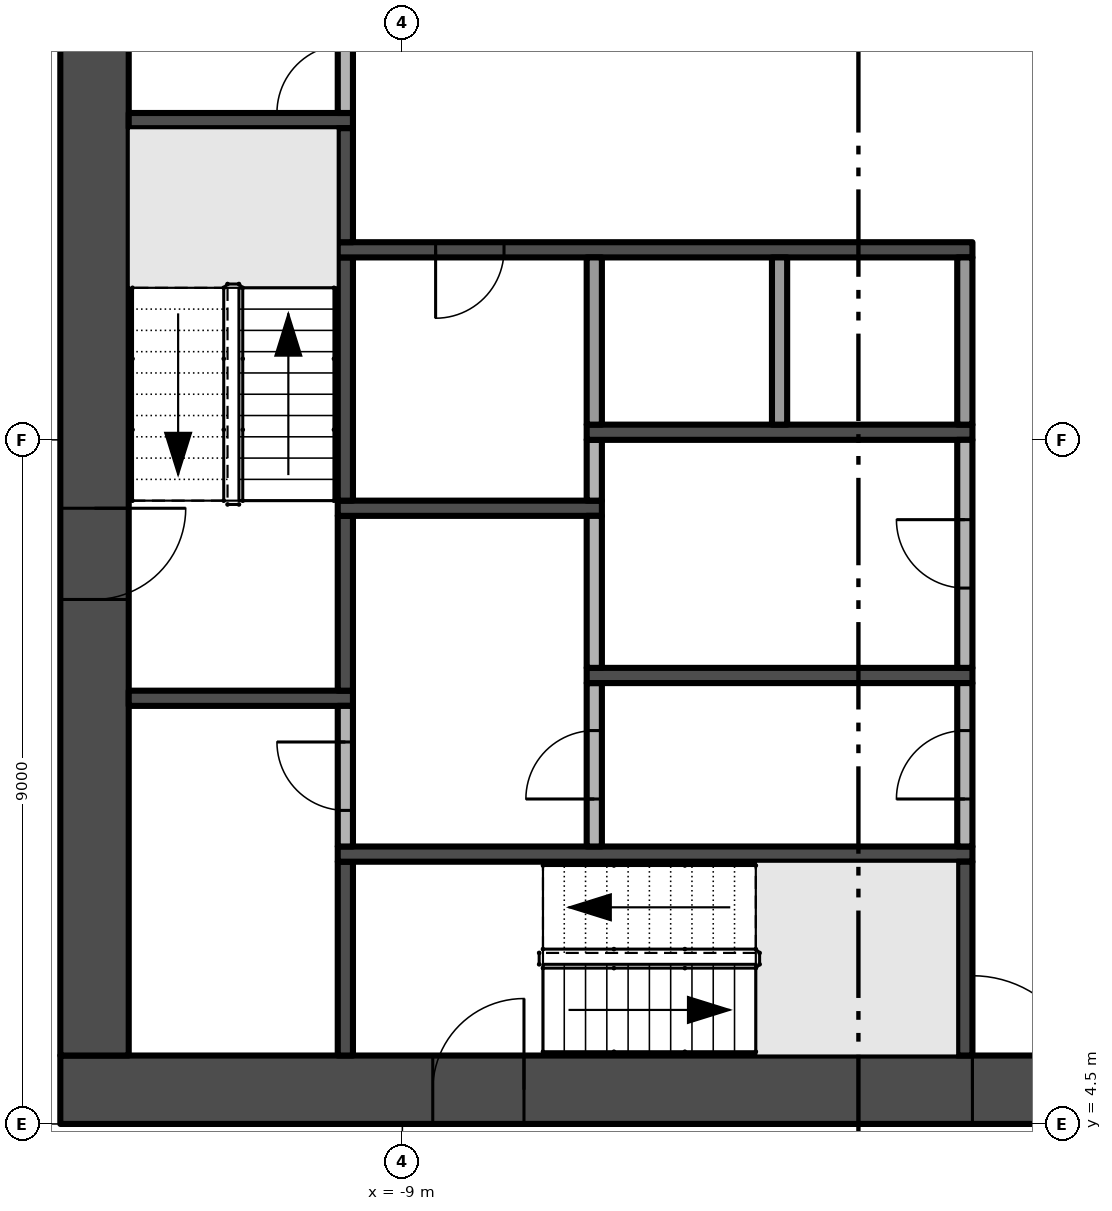
"""IFC4 building model, lengths in metres.
Left out: names, types, materials, properties, quantities, classifications, styles, units other than length and angle.
Written with IfcOpenShell. Run it as: python <this file> out.ifc"""

import sys

from ifc_helpers import new_model, si_unit, direction, frame, frame_2d, origin, place, context, subcontext, project, spatial, rectangle, extrude, element, fill, save


model = new_model("IFC4")
c1 = context("Model", 3, precision=1e-05, world=origin(), true_north=direction((0.0, 1.0)))
c2 = subcontext(c1, "Body", "Model", "MODEL_VIEW")
j1 = project(units=[si_unit("LENGTHUNIT", "METRE"), si_unit("PLANEANGLEUNIT", "RADIAN")], contexts=[c1])
p1 = place(None, origin())
s1 = spatial("IfcSite", under=j1, at=p1, CompositionType="ELEMENT")
p2 = place(p1, origin())
s2 = spatial("IfcBuilding", under=s1, at=p2, CompositionType="ELEMENT")
p3 = place(p2, frame((0.0, 0.0, 15.0)))
s3 = spatial("IfcBuildingStorey", under=s2, at=p3, CompositionType="ELEMENT", Elevation=15.0)
p4 = place(p3, frame((-13.5, 4.95, -0.3), z_axis=(0.0, 0.0, 1.0), x_axis=(1.0, 0.0, 0.0)))
e1 = element("IfcWall", 1, at=p4, inside=s3, PredefinedType="SHEAR", context=c2, shape_type="SweptSolid", body=[
    extrude(rectangle(XDim=27.0, YDim=0.9, at=frame_2d((13.5, 0.0))), origin(), (0.0, 0.0, 1.0), 3.8),
])
p5 = place(p4, frame((12.0, 0.0, 0.3)))
e2 = element("IfcOpeningElement", 2, at=p5, cuts=e1, PredefinedType="OPENING", context=c2, shape_type="SweptSolid", body=[
    extrude(rectangle(XDim=3.0, YDim=2.4, at=frame_2d((1.5, 1.2))), frame((0.0, 0.46, 0.0), z_axis=(0.0, -1.0, 0.0), x_axis=(1.0, 0.0, 0.0)), (0.0, 0.0, 1.0), 0.92),
])
p6 = place(p4, frame((4.9, 0.0, 0.3)))
e3 = element("IfcOpeningElement", 3, at=p6, cuts=e1, PredefinedType="OPENING", context=c2, shape_type="SweptSolid", body=[
    extrude(rectangle(XDim=1.2, YDim=2.2, at=frame_2d((0.6, 1.1))), frame((0.0, 0.46, 0.0), z_axis=(0.0, -1.0, 0.0), x_axis=(1.0, 0.0, 0.0)), (0.0, 0.0, 1.0), 0.92),
])
p7 = place(p4, frame((20.75, 0.0, 0.3)))
e4 = element("IfcOpeningElement", 4, at=p7, cuts=e1, PredefinedType="OPENING", context=c2, shape_type="SweptSolid", body=[
    extrude(rectangle(XDim=1.5, YDim=2.2, at=frame_2d((0.75, 1.1))), frame((0.0, 0.46, 0.0), z_axis=(0.0, -1.0, 0.0), x_axis=(1.0, 0.0, 0.0)), (0.0, 0.0, 1.0), 0.92),
])
p8 = place(p4, frame((17.4, 0.0, 0.3)))
e5 = element("IfcOpeningElement", 5, at=p8, cuts=e1, PredefinedType="OPENING", context=c2, shape_type="SweptSolid", body=[
    extrude(rectangle(XDim=1.2, YDim=2.2, at=frame_2d((0.6, 1.1))), frame((0.0, 0.46, 0.0), z_axis=(0.0, -1.0, 0.0), x_axis=(1.0, 0.0, 0.0)), (0.0, 0.0, 1.0), 0.92),
])
p9 = place(p3, frame((-13.05, 21.6, -0.3), z_axis=(0.0, 0.0, 1.0), x_axis=(0.0, -1.0, 0.0)))
e6 = element("IfcWall", 6, at=p9, inside=s3, PredefinedType="SHEAR", context=c2, shape_type="SweptSolid", body=[
    extrude(rectangle(XDim=16.2, YDim=0.9, at=frame_2d((8.1, 0.0))), origin(), (0.0, 0.0, 1.0), 3.8),
])
p10 = place(p9, frame((9.0, 0.0, 0.3)))
e7 = element("IfcOpeningElement", 7, at=p10, cuts=e6, PredefinedType="OPENING", context=c2, shape_type="SweptSolid", body=[
    extrude(rectangle(XDim=1.2, YDim=2.2, at=frame_2d((0.6, 1.1))), frame((0.0, 0.46, 0.0), z_axis=(0.0, -1.0, 0.0), x_axis=(1.0, 0.0, 0.0)), (0.0, 0.0, 1.0), 0.92),
])
for number, where, z_axis, x_axis in (
    (8, (-12.6, 10.1, 0.0), (0.0, 0.0, 1.0), (1.0, 0.0, 0.0)),
    (9, (-12.6, 17.7, 0.0), (0.0, 0.0, 1.0), (1.0, 0.0, 0.0)),
):
    element("IfcWall", number, at=place(p3, frame(where, z_axis=z_axis, x_axis=x_axis)), inside=s3, PredefinedType="SHEAR", context=c2, shape_type="SweptSolid", body=[
        extrude(rectangle(XDim=2.95, YDim=0.2, at=frame_2d((1.475, 0.0))), origin(), (0.0, 0.0, 1.0), 3.5),
    ])
p11 = place(p3, frame((-9.75, 5.4, 0.0), z_axis=(0.0, 0.0, 1.0), x_axis=(0.0, 1.0, 0.0)))
e10 = element("IfcWall", 10, at=p11, inside=s3, PredefinedType="SHEAR", context=c2, shape_type="SweptSolid", body=[
    extrude(rectangle(XDim=2.55, YDim=0.2, at=frame_2d((1.275, 0.0))), origin(), (0.0, 0.0, 1.0), 3.5),
])
p12 = place(p3, frame((-9.85, 8.05, 0.0), z_axis=(0.0, 0.0, 1.0), x_axis=(1.0, 0.0, 0.0)))
e11 = element("IfcWall", 11, at=p12, inside=s3, PredefinedType="SHEAR", context=c2, shape_type="SweptSolid", body=[
    extrude(rectangle(XDim=8.35, YDim=0.2, at=frame_2d((4.175, 0.0))), origin(), (0.0, 0.0, 1.0), 3.5),
])
p13 = place(p3, frame((-9.75, 8.15, 0.0), z_axis=(0.0, 0.0, 1.0), x_axis=(0.0, 1.0, 0.0)))
e12 = element("IfcWall", 12, at=p13, inside=s3, PredefinedType="PARTITIONING", context=c2, shape_type="SweptSolid", body=[
    extrude(rectangle(XDim=1.85, YDim=0.2, at=frame_2d((0.925, 0.0))), origin(), (0.0, 0.0, 1.0), 3.5),
])
p14 = place(p13, frame((0.475, 0.0, 0.0)))
e13 = element("IfcOpeningElement", 13, at=p14, cuts=e12, PredefinedType="OPENING", context=c2, shape_type="SweptSolid", body=[
    extrude(rectangle(XDim=0.9, YDim=2.1, at=frame_2d((0.45, 1.05))), frame((0.0, 0.11, 0.0), z_axis=(0.0, -1.0, 0.0), x_axis=(1.0, 0.0, 0.0)), (0.0, 0.0, 1.0), 0.22),
])
p15 = place(p3, frame((-9.75, 10.2, 0.0), z_axis=(0.0, 0.0, 1.0), x_axis=(0.0, 1.0, 0.0)))
e14 = element("IfcWall", 14, at=p15, inside=s3, PredefinedType="SHEAR", context=c2, shape_type="SweptSolid", body=[
    extrude(rectangle(XDim=2.3, YDim=0.2, at=frame_2d((1.15, 0.0))), origin(), (0.0, 0.0, 1.0), 3.5),
])
p16 = place(p3, frame((-9.85, 12.6, 0.0), z_axis=(0.0, 0.0, 1.0), x_axis=(1.0, 0.0, 0.0)))
e15 = element("IfcWall", 15, at=p16, inside=s3, PredefinedType="SHEAR", context=c2, shape_type="SweptSolid", body=[
    extrude(rectangle(XDim=3.475, YDim=0.2, at=frame_2d((1.738, 0.0))), origin(), (0.0, 0.0, 1.0), 3.5),
])
p17 = place(p3, frame((-9.75, 12.7, 0.0), z_axis=(0.0, 0.0, 1.0), x_axis=(0.0, 1.0, 0.0)))
e16 = element("IfcWall", 16, at=p17, inside=s3, PredefinedType="SHEAR", context=c2, shape_type="SweptSolid", body=[
    extrude(rectangle(XDim=3.2, YDim=0.2, at=frame_2d((1.6, 0.0))), origin(), (0.0, 0.0, 1.0), 3.5),
])
p18 = place(p3, frame((-1.5, 16.0, 0.0), z_axis=(0.0, 0.0, 1.0), x_axis=(-1.0, 0.0, 0.0)))
e17 = element("IfcWall", 17, at=p18, inside=s3, PredefinedType="SHEAR", context=c2, shape_type="SweptSolid", body=[
    extrude(rectangle(XDim=8.35, YDim=0.2, at=frame_2d((4.175, 0.0))), origin(), (0.0, 0.0, 1.0), 3.5),
])
p19 = place(p18, frame((6.162, 0.0, 0.0)))
e18 = element("IfcOpeningElement", 18, at=p19, cuts=e17, PredefinedType="OPENING", context=c2, shape_type="SweptSolid", body=[
    extrude(rectangle(XDim=0.9, YDim=2.1, at=frame_2d((0.45, 1.05))), frame((0.0, 0.11, 0.0), z_axis=(0.0, -1.0, 0.0), x_axis=(1.0, 0.0, 0.0)), (0.0, 0.0, 1.0), 0.22),
])
p20 = place(p3, frame((-9.75, 16.1, 0.0), z_axis=(0.0, 0.0, 1.0), x_axis=(0.0, 1.0, 0.0)))
e19 = element("IfcWall", 19, at=p20, inside=s3, PredefinedType="SHEAR", context=c2, shape_type="SweptSolid", body=[
    extrude(rectangle(XDim=1.5, YDim=0.2, at=frame_2d((0.75, 0.0))), origin(), (0.0, 0.0, 1.0), 3.5),
])
p21 = place(p3, frame((-9.75, 17.8, 0.0), z_axis=(0.0, 0.0, 1.0), x_axis=(0.0, 1.0, 0.0)))
e20 = element("IfcWall", 20, at=p21, inside=s3, PredefinedType="PARTITIONING", context=c2, shape_type="SweptSolid", body=[
    extrude(rectangle(XDim=1.4, YDim=0.2, at=frame_2d((0.7, 0.0))), origin(), (0.0, 0.0, 1.0), 3.5),
])
p22 = place(p21, origin())
e21 = element("IfcOpeningElement", 21, at=p22, cuts=e20, PredefinedType="OPENING", context=c2, shape_type="SweptSolid", body=[
    extrude(rectangle(XDim=0.9, YDim=2.1, at=frame_2d((0.45, 1.05))), frame((0.0, 0.11, 0.0), z_axis=(0.0, -1.0, 0.0), x_axis=(1.0, 0.0, 0.0)), (0.0, 0.0, 1.0), 0.22),
])
p23 = place(p3, frame((-6.475, 8.15, 0.0), z_axis=(0.0, 0.0, 1.0), x_axis=(0.0, 1.0, 0.0)))
e22 = element("IfcWall", 22, at=p23, inside=s3, PredefinedType="PARTITIONING", context=c2, shape_type="SweptSolid", body=[
    extrude(rectangle(XDim=2.15, YDim=0.2, at=frame_2d((1.075, 0.0))), origin(), (0.0, 0.0, 1.0), 3.5),
])
p24 = place(p23, frame((0.625, 0.0, 0.0)))
e23 = element("IfcOpeningElement", 23, at=p24, cuts=e22, PredefinedType="OPENING", context=c2, shape_type="SweptSolid", body=[
    extrude(rectangle(XDim=0.9, YDim=2.1, at=frame_2d((0.45, 1.05))), frame((0.0, 0.11, 0.0), z_axis=(0.0, -1.0, 0.0), x_axis=(1.0, 0.0, 0.0)), (0.0, 0.0, 1.0), 0.22),
])
p25 = place(p3, frame((-6.575, 10.4, 0.0), z_axis=(0.0, 0.0, 1.0), x_axis=(1.0, 0.0, 0.0)))
e24 = element("IfcWall", 24, at=p25, inside=s3, PredefinedType="SHEAR", context=c2, shape_type="SweptSolid", body=[
    extrude(rectangle(XDim=5.075, YDim=0.2, at=frame_2d((2.538, 0.0))), origin(), (0.0, 0.0, 1.0), 3.5),
])
p26 = place(p3, frame((-6.475, 10.5, 0.0), z_axis=(0.0, 0.0, 1.0), x_axis=(0.0, 1.0, 0.0)))
e25 = element("IfcWall", 25, at=p26, inside=s3, PredefinedType="PARTITIONING", context=c2, shape_type="SweptSolid", body=[
    extrude(rectangle(XDim=2.0, YDim=0.2, at=frame_2d((1.0, 0.0))), origin(), (0.0, 0.0, 1.0), 3.5),
])
p27 = place(p3, frame((-6.475, 12.7, 0.0), z_axis=(0.0, 0.0, 1.0), x_axis=(0.0, 1.0, 0.0)))
e26 = element("IfcWall", 26, at=p27, inside=s3, PredefinedType="PARTITIONING", context=c2, shape_type="SweptSolid", body=[
    extrude(rectangle(XDim=0.8, YDim=0.2, at=frame_2d((0.4, 0.0))), origin(), (0.0, 0.0, 1.0), 3.5),
])
p28 = place(p3, frame((-6.575, 13.6, 0.0), z_axis=(0.0, 0.0, 1.0), x_axis=(1.0, 0.0, 0.0)))
e27 = element("IfcWall", 27, at=p28, inside=s3, PredefinedType="SHEAR", context=c2, shape_type="SweptSolid", body=[
    extrude(rectangle(XDim=5.075, YDim=0.2, at=frame_2d((2.538, 0.0))), origin(), (0.0, 0.0, 1.0), 3.5),
])
for number, where, z_axis, x_axis in (
    (28, (-6.475, 13.7, 0.0), (0.0, 0.0, 1.0), (0.0, 1.0, 0.0)),
    (29, (-4.037, 13.7, 0.0), (0.0, 0.0, 1.0), (0.0, 1.0, 0.0)),
):
    element("IfcWall", number, at=place(p3, frame(where, z_axis=z_axis, x_axis=x_axis)), inside=s3, PredefinedType="PARTITIONING", context=c2, shape_type="SweptSolid", body=[
        extrude(rectangle(XDim=2.2, YDim=0.2, at=frame_2d((1.1, 0.0))), origin(), (0.0, 0.0, 1.0), 3.5),
    ])
p29 = place(p3, frame((-1.6, 5.4, 0.0), z_axis=(0.0, 0.0, 1.0), x_axis=(0.0, 1.0, 0.0)))
e30 = element("IfcWall", 30, at=p29, inside=s3, PredefinedType="SHEAR", context=c2, shape_type="SweptSolid", body=[
    extrude(rectangle(XDim=2.55, YDim=0.2, at=frame_2d((1.275, 0.0))), origin(), (0.0, 0.0, 1.0), 3.5),
])
p30 = place(p3, frame((-1.6, 8.15, 0.0), z_axis=(0.0, 0.0, 1.0), x_axis=(0.0, 1.0, 0.0)))
e31 = element("IfcWall", 31, at=p30, inside=s3, PredefinedType="PARTITIONING", context=c2, shape_type="SweptSolid", body=[
    extrude(rectangle(XDim=2.15, YDim=0.2, at=frame_2d((1.075, 0.0))), origin(), (0.0, 0.0, 1.0), 3.5),
])
p31 = place(p30, frame((0.625, 0.0, 0.0)))
e32 = element("IfcOpeningElement", 32, at=p31, cuts=e31, PredefinedType="OPENING", context=c2, shape_type="SweptSolid", body=[
    extrude(rectangle(XDim=0.9, YDim=2.1, at=frame_2d((0.45, 1.05))), frame((0.0, 0.11, 0.0), z_axis=(0.0, -1.0, 0.0), x_axis=(1.0, 0.0, 0.0)), (0.0, 0.0, 1.0), 0.22),
])
p32 = place(p3, frame((-1.6, 10.5, 0.0), z_axis=(0.0, 0.0, 1.0), x_axis=(0.0, 1.0, 0.0)))
e33 = element("IfcWall", 33, at=p32, inside=s3, PredefinedType="PARTITIONING", context=c2, shape_type="SweptSolid", body=[
    extrude(rectangle(XDim=3.0, YDim=0.2, at=frame_2d((1.5, 0.0))), origin(), (0.0, 0.0, 1.0), 3.5),
])
p33 = place(p32, frame((1.05, 0.0, 0.0)))
e34 = element("IfcOpeningElement", 34, at=p33, cuts=e33, PredefinedType="OPENING", context=c2, shape_type="SweptSolid", body=[
    extrude(rectangle(XDim=0.9, YDim=2.1, at=frame_2d((0.45, 1.05))), frame((0.0, 0.11, 0.0), z_axis=(0.0, -1.0, 0.0), x_axis=(1.0, 0.0, 0.0)), (0.0, 0.0, 1.0), 0.22),
])
p34 = place(p3, frame((-1.6, 13.7, 0.0), z_axis=(0.0, 0.0, 1.0), x_axis=(0.0, 1.0, 0.0)))
e35 = element("IfcWall", 35, at=p34, inside=s3, PredefinedType="PARTITIONING", context=c2, shape_type="SweptSolid", body=[
    extrude(rectangle(XDim=2.2, YDim=0.2, at=frame_2d((1.1, 0.0))), origin(), (0.0, 0.0, 1.0), 3.5),
])
p35 = place(p5, frame((3.0, 0.0, 0.0), z_axis=(0.0, 0.0, 1.0), x_axis=(-1.0, 0.0, 0.0)))
e36 = element("IfcDoor", 36, at=p35, inside=s3, OperationType="DOUBLE_DOOR_SINGLE_SWING", PredefinedType="DOOR", context=c2, shape_type="SweptSolid", body=[
    extrude(rectangle(XDim=3.0, YDim=2.4, at=frame_2d((1.5, 1.2))), frame((0.0, 0.025, 0.0), z_axis=(0.0, -1.0, 0.0), x_axis=(1.0, 0.0, 0.0)), (0.0, 0.0, 1.0), 0.05),
])
fill(e2, e36)
p36 = place(p10, frame((1.2, 0.0, 0.0), z_axis=(0.0, 0.0, 1.0), x_axis=(-1.0, 0.0, 0.0)))
e37 = element("IfcDoor", 37, at=p36, inside=s3, OperationType="SINGLE_SWING_RIGHT", PredefinedType="DOOR", context=c2, shape_type="SweptSolid", body=[
    extrude(rectangle(XDim=1.2, YDim=2.2, at=frame_2d((0.6, 1.1))), frame((0.0, 0.025, 0.0), z_axis=(0.0, -1.0, 0.0), x_axis=(1.0, 0.0, 0.0)), (0.0, 0.0, 1.0), 0.05),
])
fill(e7, e37)
p37 = place(p6, frame((1.2, 0.0, 0.0), z_axis=(0.0, 0.0, 1.0), x_axis=(-1.0, 0.0, 0.0)))
e38 = element("IfcDoor", 38, at=p37, inside=s3, OperationType="SINGLE_SWING_LEFT", PredefinedType="DOOR", context=c2, shape_type="SweptSolid", body=[
    extrude(rectangle(XDim=1.2, YDim=2.2, at=frame_2d((0.6, 1.1))), frame((0.0, 0.025, 0.0), z_axis=(0.0, -1.0, 0.0), x_axis=(1.0, 0.0, 0.0)), (0.0, 0.0, 1.0), 0.05),
])
fill(e3, e38)
p38 = place(p19, origin())
e39 = element("IfcDoor", 39, at=p38, inside=s3, OperationType="SINGLE_SWING_RIGHT", PredefinedType="DOOR", context=c2, shape_type="SweptSolid", body=[
    extrude(rectangle(XDim=0.9, YDim=2.1, at=frame_2d((0.45, 1.05))), frame((0.0, 0.025, 0.0), z_axis=(0.0, -1.0, 0.0), x_axis=(1.0, 0.0, 0.0)), (0.0, 0.0, 1.0), 0.05),
])
fill(e18, e39)
p39 = place(p31, origin())
e40 = element("IfcDoor", 40, at=p39, inside=s3, OperationType="SINGLE_SWING_LEFT", PredefinedType="DOOR", context=c2, shape_type="SweptSolid", body=[
    extrude(rectangle(XDim=0.9, YDim=2.1, at=frame_2d((0.45, 1.05))), frame((0.0, 0.025, 0.0), z_axis=(0.0, -1.0, 0.0), x_axis=(1.0, 0.0, 0.0)), (0.0, 0.0, 1.0), 0.05),
])
fill(e32, e40)
p40 = place(p33, origin())
e41 = element("IfcDoor", 41, at=p40, inside=s3, OperationType="SINGLE_SWING_RIGHT", PredefinedType="DOOR", context=c2, shape_type="SweptSolid", body=[
    extrude(rectangle(XDim=0.9, YDim=2.1, at=frame_2d((0.45, 1.05))), frame((0.0, 0.025, 0.0), z_axis=(0.0, -1.0, 0.0), x_axis=(1.0, 0.0, 0.0)), (0.0, 0.0, 1.0), 0.05),
])
fill(e34, e41)
p41 = place(p22, origin())
e42 = element("IfcDoor", 42, at=p41, inside=s3, OperationType="SINGLE_SWING_LEFT", PredefinedType="DOOR", context=c2, shape_type="SweptSolid", body=[
    extrude(rectangle(XDim=0.9, YDim=2.1, at=frame_2d((0.45, 1.05))), frame((0.0, 0.025, 0.0), z_axis=(0.0, -1.0, 0.0), x_axis=(1.0, 0.0, 0.0)), (0.0, 0.0, 1.0), 0.05),
])
fill(e21, e42)
p42 = place(p24, origin())
e43 = element("IfcDoor", 43, at=p42, inside=s3, OperationType="SINGLE_SWING_LEFT", PredefinedType="DOOR", context=c2, shape_type="SweptSolid", body=[
    extrude(rectangle(XDim=0.9, YDim=2.1, at=frame_2d((0.45, 1.05))), frame((0.0, 0.025, 0.0), z_axis=(0.0, -1.0, 0.0), x_axis=(1.0, 0.0, 0.0)), (0.0, 0.0, 1.0), 0.05),
])
fill(e23, e43)
p43 = place(p14, origin())
e44 = element("IfcDoor", 44, at=p43, inside=s3, OperationType="SINGLE_SWING_RIGHT", PredefinedType="DOOR", context=c2, shape_type="SweptSolid", body=[
    extrude(rectangle(XDim=0.9, YDim=2.1, at=frame_2d((0.45, 1.05))), frame((0.0, 0.025, 0.0), z_axis=(0.0, -1.0, 0.0), x_axis=(1.0, 0.0, 0.0)), (0.0, 0.0, 1.0), 0.05),
])
fill(e13, e44)
save(model, sys.argv[1])
